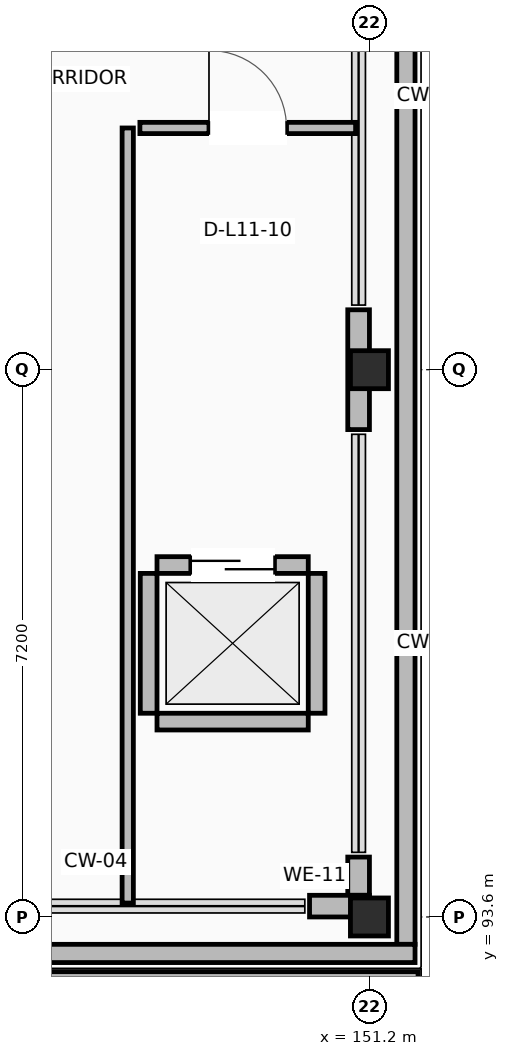
"""IFC4 building model, lengths in metres.
Left out: names, types, materials, properties, quantities, classifications, styles, units other than length and angle.
Written with IfcOpenShell. Run it as: python <this file> out.ifc"""

import sys

from ifc_helpers import new_model, si_unit, direction, frame, frame_2d, origin, origin_2d, place, context, subcontext, project, spatial, rectangle, extrude, element, fill, save


model = new_model("IFC4")
c1 = context("Model", 3, precision=1e-05, world=origin(), true_north=direction((0.0, 1.0)))
c2 = subcontext(c1, "Body", "Model", "MODEL_VIEW")
j1 = project(units=[si_unit("LENGTHUNIT", "METRE"), si_unit("PLANEANGLEUNIT", "RADIAN")], contexts=[c1])
p1 = place(None, origin())
s1 = spatial("IfcSite", under=j1, at=p1, CompositionType="ELEMENT")
p2 = place(p1, origin())
s2 = spatial("IfcBuilding", under=s1, at=p2, CompositionType="ELEMENT")
p3 = place(p2, frame((0.0, 0.0, 48.0)))
s3 = spatial("IfcBuildingStorey", under=s2, at=p3, CompositionType="ELEMENT", Elevation=48.0)
for number, where, z_axis, x_axis in (
    (1, (151.2, 93.6, 0.0), (0.0, 0.0, 1.0), (1.0, 0.0, 0.0)),
    (2, (151.2, 100.8, 0.0), (0.0, 0.0, 1.0), (1.0, 0.0, 0.0)),
):
    element("IfcColumn", number, at=place(p3, frame(where, z_axis=z_axis, x_axis=x_axis)), inside=s3, PredefinedType="COLUMN", context=c2, shape_type="SweptSolid", body=[
        extrude(rectangle(XDim=0.5, YDim=0.5, at=origin_2d()), origin(), (0.0, 0.0, 1.0), 4.2),
    ])
p4 = place(p3, frame((151.058, 93.885, 0.0), z_axis=(0.0, 0.0, 1.0), x_axis=(0.0, 1.0, 0.0)))
e3 = element("IfcWall", 3, at=p4, inside=s3, PredefinedType="STANDARD", context=c2, shape_type="SweptSolid", body=[
    extrude(rectangle(XDim=0.503, YDim=0.285, at=frame_2d((0.251, 0.0))), origin(), (0.0, 0.0, 1.0), 2.96),
])
p5 = place(p3, frame((151.058, 100.012, 0.0), z_axis=(0.0, 0.0, 1.0), x_axis=(0.0, 1.0, 0.0)))
e4 = element("IfcWall", 4, at=p5, inside=s3, PredefinedType="STANDARD", context=c2, shape_type="SweptSolid", body=[
    extrude(rectangle(XDim=1.576, YDim=0.285, at=frame_2d((0.788, 0.0))), origin(), (0.0, 0.0, 1.0), 2.96),
])
p6 = place(p3, frame((150.412, 93.742, 0.0), z_axis=(0.0, 0.0, 1.0), x_axis=(1.0, 0.0, 0.0)))
e5 = element("IfcWall", 5, at=p6, inside=s3, PredefinedType="STANDARD", context=c2, shape_type="SweptSolid", body=[
    extrude(rectangle(XDim=0.788, YDim=0.285, at=frame_2d((0.394, 0.0))), origin(), (0.0, 0.0, 1.0), 2.96),
])
p7 = place(p3, frame((151.68, 115.56, 0.0), z_axis=(0.0, 0.0, 1.0), x_axis=(0.0, -1.0, 0.0)))
e6 = element("IfcWall", 6, at=p7, inside=s3, PredefinedType="PARAPET", context=c2, shape_type="SweptSolid", body=[
    extrude(rectangle(XDim=22.32, YDim=0.24, at=frame_2d((11.16, 0.0))), origin(), (0.0, 0.0, 1.0), 1.12),
])
p8 = place(p3, frame((151.8, 93.12, 0.0), z_axis=(0.0, 0.0, 1.0), x_axis=(-1.0, 0.0, 0.0)))
e7 = element("IfcWall", 7, at=p8, inside=s3, PredefinedType="PARAPET", context=c2, shape_type="SweptSolid", body=[
    extrude(rectangle(XDim=50.44, YDim=0.24, at=frame_2d((25.22, 0.0))), origin(), (0.0, 0.0, 1.0), 1.12),
])
p9 = place(p3, frame((136.16, 92.77, 0.0), z_axis=(0.0, 0.0, 1.0), x_axis=(1.0, 0.0, 0.0)))
e8 = element("IfcWall", 8, at=p9, inside=s3, PredefinedType="PARAPET", context=c2, shape_type="SweptSolid", body=[
    extrude(rectangle(XDim=15.68, YDim=0.22, at=frame_2d((7.84, 0.0))), origin(), (0.0, 0.0, 1.0), 1.12),
])
p10 = place(p3, frame((148.405, 96.17, 0.0), z_axis=(0.0, 0.0, 1.0), x_axis=(1.0, 0.0, 0.0)))
e9 = element("IfcWall", 9, at=p10, inside=s3, PredefinedType="STANDARD", context=c2, shape_type="SweptSolid", body=[
    extrude(rectangle(XDim=1.99, YDim=0.22, at=frame_2d((0.995, 0.0))), origin(), (0.0, 0.0, 1.0), 2.96),
])
p11 = place(p3, frame((148.405, 98.23, 0.0), z_axis=(0.0, 0.0, 1.0), x_axis=(1.0, 0.0, 0.0)))
e10 = element("IfcWall", 10, at=p11, inside=s3, PredefinedType="STANDARD", context=c2, shape_type="SweptSolid", body=[
    extrude(rectangle(XDim=1.99, YDim=0.22, at=frame_2d((0.995, 0.0))), origin(), (0.0, 0.0, 1.0), 2.96),
])
p12 = place(p11, frame((0.445, 0.0, 0.0)))
e11 = element("IfcOpeningElement", 11, at=p12, cuts=e10, PredefinedType="OPENING", context=c2, shape_type="SweptSolid", body=[
    extrude(rectangle(XDim=1.1, YDim=2.15, at=frame_2d((0.55, 1.075))), frame((0.0, 0.12, 0.0), z_axis=(0.0, -1.0, 0.0), x_axis=(1.0, 0.0, 0.0)), (0.0, 0.0, 1.0), 0.24),
])
for number, where, z_axis, x_axis in (
    (12, (148.295, 96.28, 0.0), (0.0, 0.0, 1.0), (0.0, 1.0, 0.0)),
    (13, (150.505, 96.28, 0.0), (0.0, 0.0, 1.0), (0.0, 1.0, 0.0)),
):
    element("IfcWall", number, at=place(p3, frame(where, z_axis=z_axis, x_axis=x_axis)), inside=s3, PredefinedType="STANDARD", context=c2, shape_type="SweptSolid", body=[
        extrude(rectangle(XDim=1.84, YDim=0.22, at=frame_2d((0.92, 0.0))), origin(), (0.0, 0.0, 1.0), 2.96),
    ])
p13 = place(p3, frame((148.02, 93.783, 0.0), z_axis=(0.0, 0.0, 1.0), x_axis=(0.0, 1.0, 0.0)))
e14 = element("IfcWall", 14, at=p13, inside=s3, PredefinedType="PARTITIONING", context=c2, shape_type="SweptSolid", body=[
    extrude(rectangle(XDim=10.197, YDim=0.148, at=frame_2d((5.099, 0.0))), origin(), (0.0, 0.0, 1.0), 2.96),
])
p14 = place(p3, frame((148.18, 103.98, 0.0), z_axis=(0.0, 0.0, 1.0), x_axis=(1.0, 0.0, 0.0)))
e15 = element("IfcWall", 15, at=p14, inside=s3, PredefinedType="PARTITIONING", context=c2, shape_type="SweptSolid", body=[
    extrude(rectangle(XDim=2.838, YDim=0.148, at=frame_2d((1.419, 0.0))), origin(), (0.0, 0.0, 1.0), 2.96),
])
p15 = place(p14, frame((0.909, 0.0, 0.0)))
e16 = element("IfcOpeningElement", 16, at=p15, cuts=e15, PredefinedType="OPENING", context=c2, shape_type="SweptSolid", body=[
    extrude(rectangle(XDim=1.02, YDim=2.15, at=frame_2d((0.51, 1.075))), frame((0.0, 0.084, 0.0), z_axis=(0.0, -1.0, 0.0), x_axis=(1.0, 0.0, 0.0)), (0.0, 0.0, 1.0), 0.168),
])
p16 = place(p12, origin())
e17 = element("IfcDoor", 17, at=p16, inside=s3, OperationType="SLIDING_TO_RIGHT", PredefinedType="DOOR", context=c2, shape_type="SweptSolid", body=[
    extrude(rectangle(XDim=1.1, YDim=2.15, at=frame_2d((0.55, 1.075))), frame((0.0, 0.025, 0.0), z_axis=(0.0, -1.0, 0.0), x_axis=(1.0, 0.0, 0.0)), (0.0, 0.0, 1.0), 0.05),
])
fill(e11, e17)
p17 = place(p15, origin())
e18 = element("IfcDoor", 18, at=p17, inside=s3, OperationType="SINGLE_SWING_LEFT", PredefinedType="DOOR", context=c2, shape_type="SweptSolid", body=[
    extrude(rectangle(XDim=1.02, YDim=2.15, at=frame_2d((0.51, 1.075))), frame((0.0, 0.025, 0.0), z_axis=(0.0, -1.0, 0.0), x_axis=(1.0, 0.0, 0.0)), (0.0, 0.0, 1.0), 0.05),
])
fill(e16, e18)
save(model, sys.argv[1])
